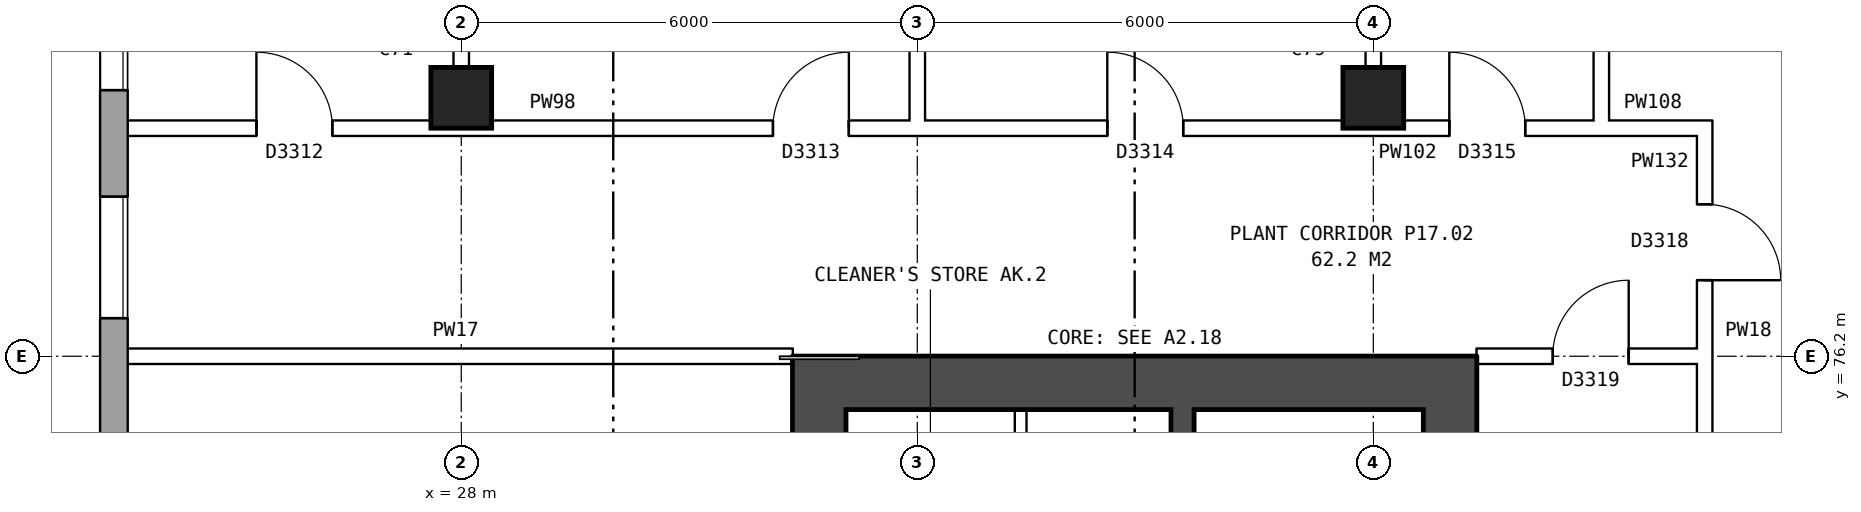
"""IFC4 building model, lengths in metres.
Left out: names, types, materials, properties, quantities, classifications, styles, units other than length and angle.
Written with IfcOpenShell. Run it as: python <this file> out.ifc"""

import sys

from ifc_helpers import new_model, si_unit, direction, frame, frame_2d, origin, origin_2d, place, context, subcontext, project, spatial, rectangle, extrude, element, fill, save


model = new_model("IFC4")
c1 = context("Model", 3, precision=1e-05, world=origin(), true_north=direction((0.0, 1.0)))
c2 = subcontext(c1, "Body", "Model", "MODEL_VIEW")
j1 = project(units=[si_unit("LENGTHUNIT", "METRE"), si_unit("PLANEANGLEUNIT", "RADIAN")], contexts=[c1])
p1 = place(None, origin())
s1 = spatial("IfcSite", under=j1, at=p1, CompositionType="ELEMENT")
p2 = place(p1, origin())
s2 = spatial("IfcBuilding", under=s1, at=p2, CompositionType="ELEMENT")
p3 = place(p2, frame((0.0, 0.0, 62.9)))
s3 = spatial("IfcBuildingStorey", under=s2, at=p3, CompositionType="ELEMENT", Elevation=62.9)
for number, where, z_axis, x_axis in (
    (1, (28.0, 79.6, 0.0), (0.0, 0.0, 1.0), (1.0, 0.0, 0.0)),
    (2, (40.0, 79.6, 0.0), (0.0, 0.0, 1.0), (1.0, 0.0, 0.0)),
):
    element("IfcColumn", number, at=place(p3, frame(where, z_axis=z_axis, x_axis=x_axis)), inside=s3, PredefinedType="COLUMN", context=c2, shape_type="SweptSolid", body=[
        extrude(rectangle(XDim=0.8, YDim=0.8, at=origin_2d()), origin(), (0.0, 0.0, 1.0), 4.2),
    ])
p4 = place(p3, frame((23.43, 82.925, 0.0), z_axis=(0.0, 0.0, 1.0), x_axis=(0.0, -1.0, 0.0)))
e3 = element("IfcWall", 3, at=p4, inside=s3, PredefinedType="STANDARD", context=c2, shape_type="SweptSolid", body=[
    extrude(rectangle(XDim=25.851, YDim=0.36, at=frame_2d((12.925, 0.0))), origin(), (0.0, 0.0, 1.0), 4.2),
])
p5 = place(p4, frame((1.625, 0.0, 1.5)))
e4 = element("IfcOpeningElement", 4, at=p5, cuts=e3, PredefinedType="OPENING", context=c2, shape_type="SweptSolid", body=[
    extrude(rectangle(XDim=1.6, YDim=1.2, at=frame_2d((0.8, 0.6))), frame((0.0, 0.19, 0.0), z_axis=(0.0, -1.0, 0.0), x_axis=(1.0, 0.0, 0.0)), (0.0, 0.0, 1.0), 0.38),
])
p6 = place(p4, frame((4.625, 0.0, 1.5)))
e5 = element("IfcOpeningElement", 5, at=p6, cuts=e3, PredefinedType="OPENING", context=c2, shape_type="SweptSolid", body=[
    extrude(rectangle(XDim=1.6, YDim=1.2, at=frame_2d((0.8, 0.6))), frame((0.0, 0.19, 0.0), z_axis=(0.0, -1.0, 0.0), x_axis=(1.0, 0.0, 0.0)), (0.0, 0.0, 1.0), 0.38),
])
p7 = place(p4, frame((8.775, 0.0, 1.5)))
e6 = element("IfcOpeningElement", 6, at=p7, cuts=e3, PredefinedType="OPENING", context=c2, shape_type="SweptSolid", body=[
    extrude(rectangle(XDim=0.6, YDim=1.2, at=frame_2d((0.3, 0.6))), frame((0.0, 0.19, 0.0), z_axis=(0.0, -1.0, 0.0), x_axis=(1.0, 0.0, 0.0)), (0.0, 0.0, 1.0), 0.38),
])
p8 = place(p4, frame((9.675, 0.0, 1.5)))
e7 = element("IfcOpeningElement", 7, at=p8, cuts=e3, PredefinedType="OPENING", context=c2, shape_type="SweptSolid", body=[
    extrude(rectangle(XDim=1.2, YDim=1.2, at=frame_2d((0.6, 0.6))), frame((0.0, 0.19, 0.0), z_axis=(0.0, -1.0, 0.0), x_axis=(1.0, 0.0, 0.0)), (0.0, 0.0, 1.0), 0.38),
])
p9 = place(p4, frame((13.625, 0.0, 1.5)))
e8 = element("IfcOpeningElement", 8, at=p9, cuts=e3, PredefinedType="OPENING", context=c2, shape_type="SweptSolid", body=[
    extrude(rectangle(XDim=1.6, YDim=1.2, at=frame_2d((0.8, 0.6))), frame((0.0, 0.19, 0.0), z_axis=(0.0, -1.0, 0.0), x_axis=(1.0, 0.0, 0.0)), (0.0, 0.0, 1.0), 0.38),
])
p10 = place(p4, frame((16.625, 0.0, 1.5)))
e9 = element("IfcOpeningElement", 9, at=p10, cuts=e3, PredefinedType="OPENING", context=c2, shape_type="SweptSolid", body=[
    extrude(rectangle(XDim=1.6, YDim=1.2, at=frame_2d((0.8, 0.6))), frame((0.0, 0.19, 0.0), z_axis=(0.0, -1.0, 0.0), x_axis=(1.0, 0.0, 0.0)), (0.0, 0.0, 1.0), 0.38),
])
p11 = place(p4, frame((21.125, 0.0, 1.5)))
e10 = element("IfcOpeningElement", 10, at=p11, cuts=e3, PredefinedType="OPENING", context=c2, shape_type="SweptSolid", body=[
    extrude(rectangle(XDim=0.6, YDim=1.2, at=frame_2d((0.3, 0.6))), frame((0.0, 0.19, 0.0), z_axis=(0.0, -1.0, 0.0), x_axis=(1.0, 0.0, 0.0)), (0.0, 0.0, 1.0), 0.38),
])
p12 = place(p4, frame((22.325, 0.0, 1.5)))
e11 = element("IfcOpeningElement", 11, at=p12, cuts=e3, PredefinedType="OPENING", context=c2, shape_type="SweptSolid", body=[
    extrude(rectangle(XDim=0.9, YDim=1.2, at=frame_2d((0.45, 0.6))), frame((0.0, 0.19, 0.0), z_axis=(0.0, -1.0, 0.0), x_axis=(1.0, 0.0, 0.0)), (0.0, 0.0, 1.0), 0.38),
])
p13 = place(p4, frame((15.525, 0.0, 1.5)))
e12 = element("IfcOpeningElement", 12, at=p13, cuts=e3, PredefinedType="OPENING", context=c2, shape_type="SweptSolid", body=[
    extrude(rectangle(XDim=0.6, YDim=1.2, at=frame_2d((0.3, 0.6))), frame((0.0, 0.19, 0.0), z_axis=(0.0, -1.0, 0.0), x_axis=(1.0, 0.0, 0.0)), (0.0, 0.0, 1.0), 0.38),
])
p14 = place(p3, frame((41.01, 75.5, 0.0), z_axis=(0.0, 0.0, 1.0), x_axis=(0.0, -1.0, 0.0)))
e13 = element("IfcWall", 13, at=p14, inside=s3, PredefinedType="SHEAR", context=c2, shape_type="SweptSolid", body=[
    extrude(rectangle(XDim=11.0, YDim=0.7, at=frame_2d((5.5, 0.0))), origin(), (0.0, 0.0, 1.0), 4.2),
])
p15 = place(p14, frame((0.625, 0.0, 0.0)))
e14 = element("IfcOpeningElement", 14, at=p15, cuts=e13, PredefinedType="OPENING", context=c2, shape_type="SweptSolid", body=[
    extrude(rectangle(XDim=1.1, YDim=2.1, at=frame_2d((0.55, 1.05))), frame((0.0, 0.36, 0.0), z_axis=(0.0, -1.0, 0.0), x_axis=(1.0, 0.0, 0.0)), (0.0, 0.0, 1.0), 0.72),
])
p16 = place(p14, frame((2.9, 0.0, 0.0)))
e15 = element("IfcOpeningElement", 15, at=p16, cuts=e13, PredefinedType="OPENING", context=c2, shape_type="SweptSolid", body=[
    extrude(rectangle(XDim=1.1, YDim=2.1, at=frame_2d((0.55, 1.05))), frame((0.0, 0.36, 0.0), z_axis=(0.0, -1.0, 0.0), x_axis=(1.0, 0.0, 0.0)), (0.0, 0.0, 1.0), 0.72),
])
p17 = place(p14, frame((5.1, 0.0, 0.0)))
e16 = element("IfcOpeningElement", 16, at=p17, cuts=e13, PredefinedType="OPENING", context=c2, shape_type="SweptSolid", body=[
    extrude(rectangle(XDim=1.1, YDim=2.1, at=frame_2d((0.55, 1.05))), frame((0.0, 0.36, 0.0), z_axis=(0.0, -1.0, 0.0), x_axis=(1.0, 0.0, 0.0)), (0.0, 0.0, 1.0), 0.72),
])
p18 = place(p14, frame((7.3, 0.0, 0.0)))
e17 = element("IfcOpeningElement", 17, at=p18, cuts=e13, PredefinedType="OPENING", context=c2, shape_type="SweptSolid", body=[
    extrude(rectangle(XDim=1.1, YDim=2.1, at=frame_2d((0.55, 1.05))), frame((0.0, 0.36, 0.0), z_axis=(0.0, -1.0, 0.0), x_axis=(1.0, 0.0, 0.0)), (0.0, 0.0, 1.0), 0.72),
])
p19 = place(p14, frame((9.2, 0.0, 0.0)))
e18 = element("IfcOpeningElement", 18, at=p19, cuts=e13, PredefinedType="OPENING", context=c2, shape_type="SweptSolid", body=[
    extrude(rectangle(XDim=1.1, YDim=2.1, at=frame_2d((0.55, 1.05))), frame((0.0, 0.36, 0.0), z_axis=(0.0, -1.0, 0.0), x_axis=(1.0, 0.0, 0.0)), (0.0, 0.0, 1.0), 0.72),
])
p20 = place(p3, frame((32.71, 75.5, 0.0), z_axis=(0.0, 0.0, 1.0), x_axis=(0.0, -1.0, 0.0)))
e19 = element("IfcWall", 19, at=p20, inside=s3, PredefinedType="SHEAR", context=c2, shape_type="SweptSolid", body=[
    extrude(rectangle(XDim=11.0, YDim=0.7, at=frame_2d((5.5, 0.0))), origin(), (0.0, 0.0, 1.0), 4.2),
])
p21 = place(p3, frame((41.36, 75.85, 0.0), z_axis=(0.0, 0.0, 1.0), x_axis=(-1.0, 0.0, 0.0)))
e20 = element("IfcWall", 20, at=p21, inside=s3, PredefinedType="SHEAR", context=c2, shape_type="SweptSolid", body=[
    extrude(rectangle(XDim=9.0, YDim=0.7, at=frame_2d((4.5, 0.0))), origin(), (0.0, 0.0, 1.0), 4.2),
])
p22 = place(p3, frame((37.49, 75.5, 0.0), z_axis=(0.0, 0.0, 1.0), x_axis=(0.0, -1.0, 0.0)))
e21 = element("IfcWall", 21, at=p22, inside=s3, PredefinedType="SHEAR", context=c2, shape_type="SweptSolid", body=[
    extrude(rectangle(XDim=2.2, YDim=0.3, at=frame_2d((1.1, 0.0))), origin(), (0.0, 0.0, 1.0), 4.2),
])
p23 = place(p3, frame((35.36, 75.5, 0.0), z_axis=(0.0, 0.0, 1.0), x_axis=(0.0, -1.0, 0.0)))
e22 = element("IfcWall", 22, at=p23, inside=s3, PredefinedType="PARTITIONING", context=c2, shape_type="SweptSolid", body=[
    extrude(rectangle(XDim=1.7, YDim=0.15, at=frame_2d((0.85, 0.0))), origin(), (0.0, 0.0, 1.0), 4.2),
])
p24 = place(p23, frame((0.425, 0.0, 0.0)))
e23 = element("IfcOpeningElement", 23, at=p24, cuts=e22, PredefinedType="OPENING", context=c2, shape_type="SweptSolid", body=[
    extrude(rectangle(XDim=0.85, YDim=2.1, at=frame_2d((0.425, 1.05))), frame((0.0, 0.085, 0.0), z_axis=(0.0, -1.0, 0.0), x_axis=(1.0, 0.0, 0.0)), (0.0, 0.0, 1.0), 0.17),
])
p25 = place(p3, frame((44.36, 63.9, 0.0), z_axis=(0.0, 0.0, 1.0), x_axis=(0.0, 1.0, 0.0)))
e24 = element("IfcWall", 24, at=p25, inside=s3, PredefinedType="PARTITIONING", context=c2, shape_type="SweptSolid", body=[
    extrude(rectangle(XDim=12.2, YDim=0.2, at=frame_2d((6.1, 0.0))), origin(), (0.0, 0.0, 1.0), 4.2),
])
p26 = place(p25, frame((5.1, 0.0, 0.0)))
e25 = element("IfcOpeningElement", 25, at=p26, cuts=e24, PredefinedType="OPENING", context=c2, shape_type="SweptSolid", body=[
    extrude(rectangle(XDim=2.0, YDim=2.1, at=frame_2d((1.0, 1.05))), frame((0.0, 0.11, 0.0), z_axis=(0.0, -1.0, 0.0), x_axis=(1.0, 0.0, 0.0)), (0.0, 0.0, 1.0), 0.22),
])
p27 = place(p3, frame((23.49, 76.2, 0.0), z_axis=(0.0, 0.0, 1.0), x_axis=(1.0, 0.0, 0.0)))
e26 = element("IfcWall", 26, at=p27, inside=s3, PredefinedType="PARTITIONING", context=c2, shape_type="SweptSolid", body=[
    extrude(rectangle(XDim=8.87, YDim=0.2, at=frame_2d((4.435, 0.0))), origin(), (0.0, 0.0, 1.0), 4.2),
])
p28 = place(p3, frame((41.36, 76.2, 0.0), z_axis=(0.0, 0.0, 1.0), x_axis=(1.0, 0.0, 0.0)))
e27 = element("IfcWall", 27, at=p28, inside=s3, PredefinedType="PARTITIONING", context=c2, shape_type="SweptSolid", body=[
    extrude(rectangle(XDim=3.1, YDim=0.2, at=frame_2d((1.55, 0.0))), origin(), (0.0, 0.0, 1.0), 4.2),
])
p29 = place(p28, frame((1.0, 0.0, 0.0)))
e28 = element("IfcOpeningElement", 28, at=p29, cuts=e27, PredefinedType="OPENING", context=c2, shape_type="SweptSolid", body=[
    extrude(rectangle(XDim=1.0, YDim=2.1, at=frame_2d((0.5, 1.05))), frame((0.0, 0.11, 0.0), z_axis=(0.0, -1.0, 0.0), x_axis=(1.0, 0.0, 0.0)), (0.0, 0.0, 1.0), 0.22),
])
p30 = place(p3, frame((23.49, 79.2, 0.0), z_axis=(0.0, 0.0, 1.0), x_axis=(1.0, 0.0, 0.0)))
e29 = element("IfcWall", 29, at=p30, inside=s3, PredefinedType="PARTITIONING", context=c2, shape_type="SweptSolid", body=[
    extrude(rectangle(XDim=16.61, YDim=0.2, at=frame_2d((8.305, 0.0))), origin(), (0.0, 0.0, 1.0), 4.2),
])
p31 = place(p30, frame((1.815, 0.0, 0.0)))
e30 = element("IfcOpeningElement", 30, at=p31, cuts=e29, PredefinedType="OPENING", context=c2, shape_type="SweptSolid", body=[
    extrude(rectangle(XDim=1.0, YDim=2.1, at=frame_2d((0.5, 1.05))), frame((0.0, 0.11, 0.0), z_axis=(0.0, -1.0, 0.0), x_axis=(1.0, 0.0, 0.0)), (0.0, 0.0, 1.0), 0.22),
])
p32 = place(p30, frame((8.61, 0.0, 0.0)))
e31 = element("IfcOpeningElement", 31, at=p32, cuts=e29, PredefinedType="OPENING", context=c2, shape_type="SweptSolid", body=[
    extrude(rectangle(XDim=1.0, YDim=2.1, at=frame_2d((0.5, 1.05))), frame((0.0, 0.11, 0.0), z_axis=(0.0, -1.0, 0.0), x_axis=(1.0, 0.0, 0.0)), (0.0, 0.0, 1.0), 0.22),
])
p33 = place(p30, frame((13.01, 0.0, 0.0)))
e32 = element("IfcOpeningElement", 32, at=p33, cuts=e29, PredefinedType="OPENING", context=c2, shape_type="SweptSolid", body=[
    extrude(rectangle(XDim=1.0, YDim=2.1, at=frame_2d((0.5, 1.05))), frame((0.0, 0.11, 0.0), z_axis=(0.0, -1.0, 0.0), x_axis=(1.0, 0.0, 0.0)), (0.0, 0.0, 1.0), 0.22),
])
p34 = place(p3, frame((42.9, 79.2, 0.0), z_axis=(0.0, 0.0, 1.0), x_axis=(1.0, 0.0, 0.0)))
e33 = element("IfcWall", 33, at=p34, inside=s3, PredefinedType="PARTITIONING", context=c2, shape_type="SweptSolid", body=[
    extrude(rectangle(XDim=1.56, YDim=0.2, at=frame_2d((0.78, 0.0))), origin(), (0.0, 0.0, 1.0), 4.2),
])
p35 = place(p3, frame((39.9, 79.2, 0.0), z_axis=(0.0, 0.0, 1.0), x_axis=(1.0, 0.0, 0.0)))
e34 = element("IfcWall", 34, at=p35, inside=s3, PredefinedType="PARTITIONING", context=c2, shape_type="SweptSolid", body=[
    extrude(rectangle(XDim=3.2, YDim=0.2, at=frame_2d((1.6, 0.0))), origin(), (0.0, 0.0, 1.0), 4.2),
])
p36 = place(p35, frame((1.1, 0.0, 0.0)))
e35 = element("IfcOpeningElement", 35, at=p36, cuts=e34, PredefinedType="OPENING", context=c2, shape_type="SweptSolid", body=[
    extrude(rectangle(XDim=1.0, YDim=2.1, at=frame_2d((0.5, 1.05))), frame((0.0, 0.11, 0.0), z_axis=(0.0, -1.0, 0.0), x_axis=(1.0, 0.0, 0.0)), (0.0, 0.0, 1.0), 0.22),
])
for number, where, z_axis, x_axis in (
    (36, (28.0, 79.1, 0.0), (0.0, 0.0, 1.0), (0.0, 1.0, 0.0)),
    (37, (34.0, 79.1, 0.0), (0.0, 0.0, 1.0), (0.0, 1.0, 0.0)),
    (38, (40.0, 79.1, 0.0), (0.0, 0.0, 1.0), (0.0, 1.0, 0.0)),
    (39, (43.0, 79.1, 0.0), (0.0, 0.0, 1.0), (0.0, 1.0, 0.0)),
):
    element("IfcWall", number, at=place(p3, frame(where, z_axis=z_axis, x_axis=x_axis)), inside=s3, PredefinedType="PARTITIONING", context=c2, shape_type="SweptSolid", body=[
        extrude(rectangle(XDim=6.66, YDim=0.2, at=frame_2d((3.33, 0.0))), origin(), (0.0, 0.0, 1.0), 4.2),
    ])
p37 = place(p3, frame((44.36, 76.1, 0.0), z_axis=(0.0, 0.0, 1.0), x_axis=(0.0, 1.0, 0.0)))
e40 = element("IfcWall", 40, at=p37, inside=s3, PredefinedType="PARTITIONING", context=c2, shape_type="SweptSolid", body=[
    extrude(rectangle(XDim=3.2, YDim=0.2, at=frame_2d((1.6, 0.0))), origin(), (0.0, 0.0, 1.0), 4.2),
])
p38 = place(p37, frame((1.1, 0.0, 0.0)))
e41 = element("IfcOpeningElement", 41, at=p38, cuts=e40, PredefinedType="OPENING", context=c2, shape_type="SweptSolid", body=[
    extrude(rectangle(XDim=1.0, YDim=2.1, at=frame_2d((0.5, 1.05))), frame((0.0, 0.11, 0.0), z_axis=(0.0, -1.0, 0.0), x_axis=(1.0, 0.0, 0.0)), (0.0, 0.0, 1.0), 0.22),
])
p39 = place(p5, origin())
e42 = element("IfcWindow", 42, at=p39, inside=s3, PartitioningType="DOUBLE_PANEL_HORIZONTAL", PredefinedType="WINDOW", context=c2, shape_type="SweptSolid", body=[
    extrude(rectangle(XDim=1.6, YDim=1.2, at=frame_2d((0.8, 0.6))), frame((0.0, 0.15, 0.0), z_axis=(0.0, -1.0, 0.0), x_axis=(1.0, 0.0, 0.0)), (0.0, 0.0, 1.0), 0.06),
])
fill(e4, e42)
p40 = place(p6, origin())
e43 = element("IfcWindow", 43, at=p40, inside=s3, PartitioningType="DOUBLE_PANEL_HORIZONTAL", PredefinedType="WINDOW", context=c2, shape_type="SweptSolid", body=[
    extrude(rectangle(XDim=1.6, YDim=1.2, at=frame_2d((0.8, 0.6))), frame((0.0, 0.15, 0.0), z_axis=(0.0, -1.0, 0.0), x_axis=(1.0, 0.0, 0.0)), (0.0, 0.0, 1.0), 0.06),
])
fill(e5, e43)
p41 = place(p29, origin())
e44 = element("IfcDoor", 44, at=p41, inside=s3, OperationType="SINGLE_SWING_RIGHT", PredefinedType="DOOR", context=c2, shape_type="SweptSolid", body=[
    extrude(rectangle(XDim=1.0, YDim=2.1, at=frame_2d((0.5, 1.05))), frame((0.0, 0.025, 0.0), z_axis=(0.0, -1.0, 0.0), x_axis=(1.0, 0.0, 0.0)), (0.0, 0.0, 1.0), 0.05),
])
fill(e28, e44)
p42 = place(p31, origin())
e45 = element("IfcDoor", 45, at=p42, inside=s3, OperationType="SINGLE_SWING_LEFT", PredefinedType="DOOR", context=c2, shape_type="SweptSolid", body=[
    extrude(rectangle(XDim=1.0, YDim=2.1, at=frame_2d((0.5, 1.05))), frame((0.0, 0.025, 0.0), z_axis=(0.0, -1.0, 0.0), x_axis=(1.0, 0.0, 0.0)), (0.0, 0.0, 1.0), 0.05),
])
fill(e30, e45)
p43 = place(p32, origin())
e46 = element("IfcDoor", 46, at=p43, inside=s3, OperationType="SINGLE_SWING_RIGHT", PredefinedType="DOOR", context=c2, shape_type="SweptSolid", body=[
    extrude(rectangle(XDim=1.0, YDim=2.1, at=frame_2d((0.5, 1.05))), frame((0.0, 0.025, 0.0), z_axis=(0.0, -1.0, 0.0), x_axis=(1.0, 0.0, 0.0)), (0.0, 0.0, 1.0), 0.05),
])
fill(e31, e46)
p44 = place(p33, origin())
e47 = element("IfcDoor", 47, at=p44, inside=s3, OperationType="SINGLE_SWING_LEFT", PredefinedType="DOOR", context=c2, shape_type="SweptSolid", body=[
    extrude(rectangle(XDim=1.0, YDim=2.1, at=frame_2d((0.5, 1.05))), frame((0.0, 0.025, 0.0), z_axis=(0.0, -1.0, 0.0), x_axis=(1.0, 0.0, 0.0)), (0.0, 0.0, 1.0), 0.05),
])
fill(e32, e47)
p45 = place(p36, origin())
e48 = element("IfcDoor", 48, at=p45, inside=s3, OperationType="SINGLE_SWING_LEFT", PredefinedType="DOOR", context=c2, shape_type="SweptSolid", body=[
    extrude(rectangle(XDim=1.0, YDim=2.1, at=frame_2d((0.5, 1.05))), frame((0.0, 0.025, 0.0), z_axis=(0.0, -1.0, 0.0), x_axis=(1.0, 0.0, 0.0)), (0.0, 0.0, 1.0), 0.05),
])
fill(e35, e48)
p46 = place(p38, frame((1.0, 0.0, 0.0), z_axis=(0.0, 0.0, 1.0), x_axis=(-1.0, 0.0, 0.0)))
e49 = element("IfcDoor", 49, at=p46, inside=s3, OperationType="SINGLE_SWING_RIGHT", PredefinedType="DOOR", context=c2, shape_type="SweptSolid", body=[
    extrude(rectangle(XDim=1.0, YDim=2.1, at=frame_2d((0.5, 1.05))), frame((0.0, 0.025, 0.0), z_axis=(0.0, -1.0, 0.0), x_axis=(1.0, 0.0, 0.0)), (0.0, 0.0, 1.0), 0.05),
])
fill(e41, e49)
save(model, sys.argv[1])
